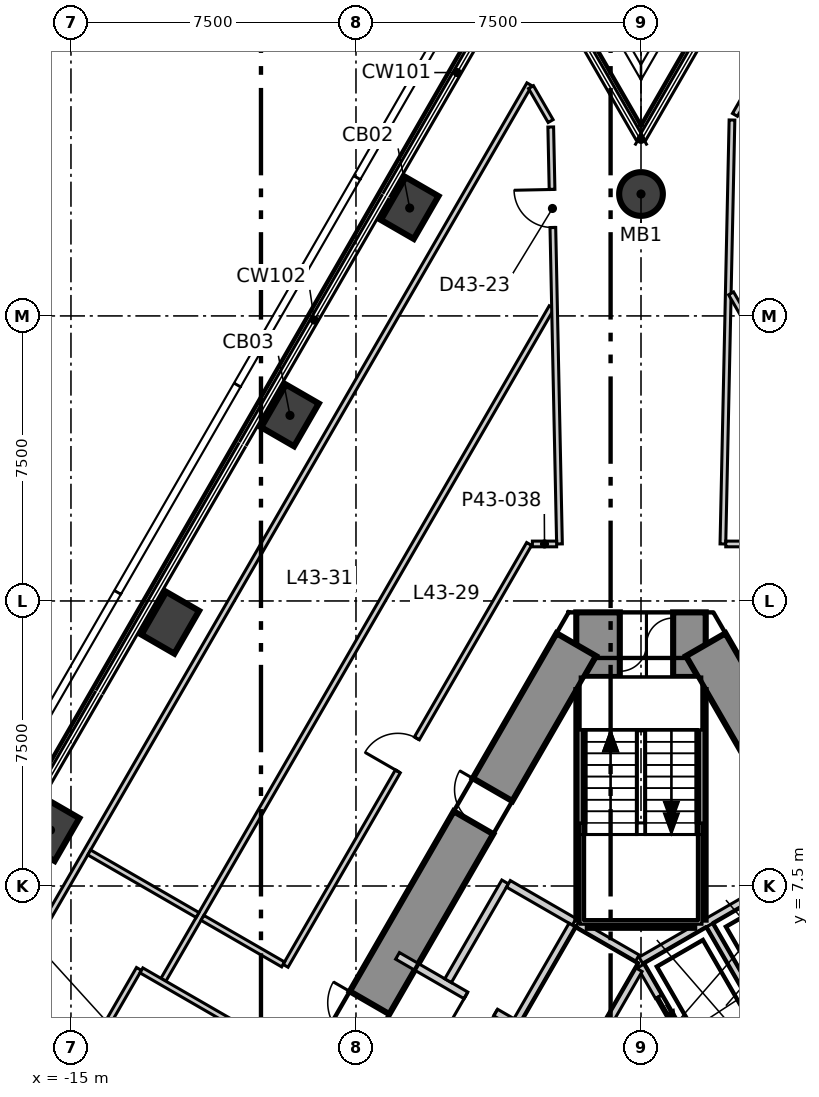
"""IFC4 building model, lengths in metres.
Left out: names, types, materials, properties, quantities, classifications, styles, units other than length and angle.
Written with IfcOpenShell. Run it as: python <this file> out.ifc"""

import sys

from ifc_helpers import new_model, si_unit, direction, frame, frame_2d, origin, origin_2d, place, context, subcontext, project, spatial, polyline, rectangle, circle, outline, extrude, element, fill, save


model = new_model("IFC4")
c1 = context("Model", 3, precision=1e-05, world=origin(), true_north=direction((0.0, 1.0)))
c2 = subcontext(c1, "Body", "Model", "MODEL_VIEW")
j1 = project(units=[si_unit("LENGTHUNIT", "METRE"), si_unit("PLANEANGLEUNIT", "RADIAN")], contexts=[c1])
p1 = place(None, origin())
s1 = spatial("IfcSite", under=j1, at=p1, CompositionType="ELEMENT")
p2 = place(p1, origin())
s2 = spatial("IfcBuilding", under=s1, at=p2, CompositionType="ELEMENT")
p3 = place(p2, frame((0.0, 0.0, 185.3)))
s3 = spatial("IfcBuildingStorey", under=s2, at=p3, CompositionType="ELEMENT", Elevation=185.3)
p4 = place(p3, frame((1.703, 13.85, -0.6), z_axis=(0.0, 0.0, 1.0), x_axis=(-1.0, 0.0, 0.0)))
e1 = element("IfcWall", 1, at=p4, inside=s3, PredefinedType="SHEAR", context=c2, shape_type="SweptSolid", body=[
    extrude(outline(polyline([(-0.202, -0.85), (1.703, -0.85), (3.608, -0.85), (3.204, 0.85), (1.703, 0.85), (0.202, 0.85), (-0.202, -0.85)])), origin(), (0.0, 0.0, 1.0), 6.3),
])
p5 = place(p4, frame((0.859, 0.0, 0.6)))
e2 = element("IfcOpeningElement", 2, at=p5, cuts=e1, PredefinedType="OPENING", context=c2, shape_type="SweptSolid", body=[
    extrude(rectangle(XDim=1.4, YDim=2.1, at=frame_2d((0.7, 1.05))), frame((0.0, 0.86, 0.0), z_axis=(0.0, -1.0, 0.0), x_axis=(1.0, 0.0, 0.0)), (0.0, 0.0, 1.0), 1.72),
])
p6 = place(p3, frame((-1.703, 13.85, -0.6), z_axis=(0.0, 0.0, 1.0), x_axis=(-0.500005991004, -0.866021944849, 0.0)))
e3 = element("IfcWall", 3, at=p6, inside=s3, PredefinedType="SHEAR", context=c2, shape_type="SweptSolid", body=[
    extrude(outline(polyline([(-0.635, -0.6), (1.328, -0.6), (3.291, -0.6), (5.254, -0.6), (7.217, -0.6), (9.18, -0.6), (11.143, -0.6), (13.106, -0.6), (15.069, -0.6), (17.032, -0.6), (18.995, -0.6), (20.958, -0.6), (22.921, -0.6), (21.651, 0.6), (19.74, 0.6), (17.83, 0.6), (15.919, 0.6), (14.009, 0.6), (12.098, 0.6), (10.188, 0.6), (8.277, 0.6), (6.367, 0.6), (4.456, 0.6), (2.546, 0.6), (0.635, 0.6), (-0.635, -0.6)])), origin(), (0.0, 0.0, 1.0), 6.3),
])
p7 = place(p6, frame((10.881, 0.0, 0.6)))
e4 = element("IfcOpeningElement", 4, at=p7, cuts=e3, PredefinedType="OPENING", context=c2, shape_type="SweptSolid", body=[
    extrude(rectangle(XDim=1.1, YDim=2.1, at=frame_2d((0.55, 1.05))), frame((0.0, 0.61, 0.0), z_axis=(0.0, -1.0, 0.0), x_axis=(1.0, 0.0, 0.0)), (0.0, 0.0, 1.0), 1.22),
])
p8 = place(p6, frame((4.407, 0.0, 0.6)))
e5 = element("IfcOpeningElement", 5, at=p8, cuts=e3, PredefinedType="OPENING", context=c2, shape_type="SweptSolid", body=[
    extrude(rectangle(XDim=1.0, YDim=2.1, at=frame_2d((0.5, 1.05))), frame((0.0, 0.61, 0.0), z_axis=(0.0, -1.0, 0.0), x_axis=(1.0, 0.0, 0.0)), (0.0, 0.0, 1.0), 1.22),
])
p9 = place(p3, frame((12.846, -5.45, -0.6), z_axis=(0.0, 0.0, 1.0), x_axis=(-0.500005991004, 0.866021944849, 0.0)))
e6 = element("IfcWall", 6, at=p9, inside=s3, PredefinedType="SHEAR", context=c2, shape_type="SweptSolid", body=[
    extrude(outline(polyline([(-0.635, -0.6), (1.328, -0.6), (3.291, -0.6), (5.254, -0.6), (7.217, -0.6), (9.18, -0.6), (11.143, -0.6), (13.106, -0.6), (15.069, -0.6), (17.032, -0.6), (18.995, -0.6), (20.958, -0.6), (22.921, -0.6), (21.651, 0.6), (19.74, 0.6), (17.83, 0.6), (15.919, 0.6), (14.009, 0.6), (12.098, 0.6), (10.188, 0.6), (8.277, 0.6), (6.367, 0.6), (4.456, 0.6), (2.546, 0.6), (0.635, 0.6), (-0.635, -0.6)])), origin(), (0.0, 0.0, 1.0), 6.3),
])
p10 = place(p9, frame((10.531, 0.0, 0.6)))
e7 = element("IfcOpeningElement", 7, at=p10, cuts=e6, PredefinedType="OPENING", context=c2, shape_type="SweptSolid", body=[
    extrude(rectangle(XDim=1.8, YDim=2.1, at=frame_2d((0.9, 1.05))), frame((0.0, 0.61, 0.0), z_axis=(0.0, -1.0, 0.0), x_axis=(1.0, 0.0, 0.0)), (0.0, 0.0, 1.0), 1.22),
])
p11 = place(p9, frame((17.506, 0.0, 0.6)))
e8 = element("IfcOpeningElement", 8, at=p11, cuts=e6, PredefinedType="OPENING", context=c2, shape_type="SweptSolid", body=[
    extrude(rectangle(XDim=0.9, YDim=2.1, at=frame_2d((0.45, 1.05))), frame((0.0, 0.61, 0.0), z_axis=(0.0, -1.0, 0.0), x_axis=(1.0, 0.0, 0.0)), (0.0, 0.0, 1.0), 1.22),
])
for number, where, z_axis, x_axis in (
    (9, (-6.087, 25.339, -0.6), (0.0, 0.0, 1.0), (0.5, 0.866, 0.0)),
    (10, (-9.237, 19.883, -0.6), (0.0, 0.0, 1.0), (0.5, 0.866, 0.0)),
    (11, (-12.387, 14.427, -0.6), (0.0, 0.0, 1.0), (0.5, 0.866, 0.0)),
    (12, (-15.538, 8.971, -0.6), (0.0, 0.0, 1.0), (0.5, 0.866, 0.0)),
):
    element("IfcColumn", number, at=place(p3, frame(where, z_axis=z_axis, x_axis=x_axis)), inside=s3, PredefinedType="COLUMN", context=c2, shape_type="SweptSolid", body=[
        extrude(rectangle(XDim=1.3, YDim=1.0, at=origin_2d()), origin(), (0.0, 0.0, 1.0), 6.3),
    ])
p12 = place(p3, frame((0.0, 25.708, -0.6), z_axis=(0.0, 0.0, 1.0), x_axis=(1.0, 0.0, 0.0)))
e13 = element("IfcColumn", 13, at=p12, inside=s3, PredefinedType="COLUMN", context=c2, shape_type="SweptSolid", body=[
    extrude(circle(Radius=0.575, at=origin_2d()), origin(), (0.0, 0.0, 1.0), 6.3),
])
p13 = place(p3, frame((2.155, 16.5, 0.0), z_axis=(0.0, 0.0, 1.0), x_axis=(0.021421622411, 0.999770530719, 0.0)))
e14 = element("IfcWall", 14, at=p13, inside=s3, PredefinedType="PARTITIONING", context=c2, shape_type="SweptSolid", body=[
    extrude(rectangle(XDim=11.157, YDim=0.15, at=frame_2d((5.579, 0.0))), origin(), (0.0, 0.0, 1.0), 5.0),
])
p14 = place(p3, frame((2.472, 27.79, 0.0), z_axis=(0.0, 0.0, 1.0), x_axis=(0.500290723946, 0.86585748916, 0.0)))
e15 = element("IfcWall", 15, at=p14, inside=s3, PredefinedType="PARTITIONING", context=c2, shape_type="SweptSolid", body=[
    extrude(rectangle(XDim=0.93, YDim=0.15, at=frame_2d((0.465, 0.0))), origin(), (0.0, 0.0, 1.0), 5.7),
])
p15 = place(p3, frame((2.23, 16.5, 0.0), z_axis=(0.0, 0.0, 1.0), x_axis=(1.0, 0.0, 0.0)))
e16 = element("IfcWall", 16, at=p15, inside=s3, PredefinedType="PARTITIONING", context=c2, shape_type="SweptSolid", body=[
    extrude(rectangle(XDim=0.628, YDim=0.15, at=frame_2d((0.314, 0.0))), origin(), (0.0, 0.0, 1.0), 5.7),
])
p16 = place(p3, frame((2.371, 23.093, 0.0), z_axis=(0.0, 0.0, 1.0), x_axis=(0.500006092323, -0.866021886352, 0.0)))
e17 = element("IfcWall", 17, at=p16, inside=s3, PredefinedType="PARTITIONING", context=c2, shape_type="SweptSolid", body=[
    extrude(rectangle(XDim=37.651, YDim=0.15, at=frame_2d((18.826, 0.0))), origin(), (0.0, 0.0, 1.0), 5.7),
])
p17 = place(p3, frame((-9.353, 5.4, 0.0), z_axis=(0.0, 0.0, 1.0), x_axis=(0.500017037849, 0.866015566754, 0.0)))
e18 = element("IfcWall", 18, at=p17, inside=s3, PredefinedType="PARTITIONING", context=c2, shape_type="SweptSolid", body=[
    extrude(rectangle(XDim=12.817, YDim=0.15, at=frame_2d((6.409, 0.0))), origin(), (0.0, 0.0, 1.0), 5.7),
])
p18 = place(p17, frame((5.909, 0.0, 0.0)))
e19 = element("IfcOpeningElement", 19, at=p18, cuts=e18, PredefinedType="OPENING", context=c2, shape_type="SweptSolid", body=[
    extrude(rectangle(XDim=1.0, YDim=2.1, at=frame_2d((0.5, 1.05))), frame((0.0, 0.085, 0.0), z_axis=(0.0, -1.0, 0.0), x_axis=(1.0, 0.0, 0.0)), (0.0, 0.0, 1.0), 0.17),
])
p19 = place(p3, frame((-12.567, 5.033, 0.0), z_axis=(0.0, 0.0, 1.0), x_axis=(0.499999287049, 0.866025815407, 0.0)))
e20 = element("IfcWall", 20, at=p19, inside=s3, PredefinedType="PARTITIONING", context=c2, shape_type="SweptSolid", body=[
    extrude(rectangle(XDim=20.434, YDim=0.15, at=frame_2d((10.217, 0.0))), origin(), (0.0, 0.0, 1.0), 5.7),
])
p20 = place(p3, frame((-26.19, -11.679, 0.0), z_axis=(0.0, 0.0, 1.0), x_axis=(0.500012382508, 0.866018254622, 0.0)))
e21 = element("IfcWall", 21, at=p20, inside=s3, PredefinedType="PARTITIONING", context=c2, shape_type="SweptSolid", body=[
    extrude(rectangle(XDim=46.505, YDim=0.15, at=frame_2d((23.252, 0.0))), origin(), (0.0, 0.0, 1.0), 5.7),
])
p21 = place(p3, frame((-2.894, 28.52, 0.0), z_axis=(0.0, 0.0, 1.0), x_axis=(0.500364349859, -0.865814944079, 0.0)))
e22 = element("IfcWall", 22, at=p21, inside=s3, PredefinedType="PARTITIONING", context=c2, shape_type="SweptSolid", body=[
    extrude(rectangle(XDim=1.031, YDim=0.15, at=frame_2d((0.516, 0.0))), origin(), (0.0, 0.0, 1.0), 5.7),
])
p22 = place(p3, frame((-2.375, 27.471, 0.0), z_axis=(0.0, 0.0, 1.0), x_axis=(0.020958076747, -0.999780355388, 0.0)))
e23 = element("IfcWall", 23, at=p22, inside=s3, PredefinedType="PARTITIONING", context=c2, shape_type="SweptSolid", body=[
    extrude(rectangle(XDim=10.973, YDim=0.15, at=frame_2d((5.487, 0.0))), origin(), (0.0, 0.0, 1.0), 5.0),
])
p23 = place(p22, frame((1.644, 0.0, 0.0)))
e24 = element("IfcOpeningElement", 24, at=p23, cuts=e23, PredefinedType="OPENING", context=c2, shape_type="SweptSolid", body=[
    extrude(rectangle(XDim=1.0, YDim=2.1, at=frame_2d((0.5, 1.05))), frame((0.0, 0.085, 0.0), z_axis=(0.0, -1.0, 0.0), x_axis=(1.0, 0.0, 0.0)), (0.0, 0.0, 1.0), 0.17),
])
p24 = place(p3, frame((-14.52, 8.383, 0.0), z_axis=(0.0, 0.0, 1.0), x_axis=(0.865960739811, -0.500111984565, 0.0)))
e25 = element("IfcWall", 25, at=p24, inside=s3, PredefinedType="PARTITIONING", context=c2, shape_type="SweptSolid", body=[
    extrude(rectangle(XDim=3.291, YDim=0.15, at=frame_2d((1.646, 0.0))), origin(), (0.0, 0.0, 1.0), 5.2),
])
p25 = place(p3, frame((-11.54, 6.662, 0.0), z_axis=(0.0, 0.0, 1.0), x_axis=(0.8660395779, -0.499975448907, 0.0)))
e26 = element("IfcWall", 26, at=p25, inside=s3, PredefinedType="PARTITIONING", context=c2, shape_type="SweptSolid", body=[
    extrude(rectangle(XDim=2.45, YDim=0.15, at=frame_2d((1.225, 0.0))), origin(), (0.0, 0.0, 1.0), 5.2),
])
p26 = place(p3, frame((-14.823, 2.525, 0.0), z_axis=(0.0, 0.0, 1.0), x_axis=(0.499860071841, 0.866106176273, 0.0)))
e27 = element("IfcWall", 27, at=p26, inside=s3, PredefinedType="PARTITIONING", context=c2, shape_type="SweptSolid", body=[
    extrude(rectangle(XDim=3.225, YDim=0.15, at=frame_2d((1.613, 0.0))), origin(), (0.0, 0.0, 1.0), 5.7),
])
p27 = place(p3, frame((-13.146, 5.28, 0.0), z_axis=(0.0, 0.0, 1.0), x_axis=(0.866035871367, -0.499981869177, 0.0)))
e28 = element("IfcWall", 28, at=p27, inside=s3, PredefinedType="PARTITIONING", context=c2, shape_type="SweptSolid", body=[
    extrude(rectangle(XDim=3.15, YDim=0.15, at=frame_2d((1.575, 0.0))), origin(), (0.0, 0.0, 1.0), 5.7),
])
p28 = place(p3, frame((-2.858, 16.5, 0.0), z_axis=(0.0, 0.0, 1.0), x_axis=(1.0, 0.0, 0.0)))
e29 = element("IfcWall", 29, at=p28, inside=s3, PredefinedType="PARTITIONING", context=c2, shape_type="SweptSolid", body=[
    extrude(rectangle(XDim=0.638, YDim=0.15, at=frame_2d((0.319, 0.0))), origin(), (0.0, 0.0, 1.0), 5.7),
])
p29 = place(p3, frame((-0.002, 5.541, 0.0), z_axis=(0.0, 0.0, 1.0), x_axis=(0.86600155993, 0.500041296494, 0.0)))
e30 = element("IfcWall", 30, at=p29, inside=s3, PredefinedType="SOLIDWALL", context=c2, shape_type="SweptSolid", body=[
    extrude(rectangle(XDim=4.132, YDim=0.2, at=frame_2d((2.066, 0.0))), origin(), (0.0, 0.0, 1.0), 5.7),
])
p30 = place(p3, frame((0.0, 5.4, 0.0), z_axis=(0.0, 0.0, 1.0), x_axis=(0.500103862429, -0.865965430478, 0.0)))
e31 = element("IfcWall", 31, at=p30, inside=s3, PredefinedType="SOLIDWALL", context=c2, shape_type="SweptSolid", body=[
    extrude(rectangle(XDim=2.973, YDim=0.2, at=frame_2d((1.487, 0.0))), origin(), (0.0, 0.0, 1.0), 5.7),
])
p31 = place(p30, frame((0.937, 0.0, 0.0)))
e32 = element("IfcOpeningElement", 32, at=p31, cuts=e31, PredefinedType="OPENING", context=c2, shape_type="SweptSolid", body=[
    extrude(rectangle(XDim=1.1, YDim=2.1, at=frame_2d((0.55, 1.05))), frame((0.0, 0.11, 0.0), z_axis=(0.0, -1.0, 0.0), x_axis=(1.0, 0.0, 0.0)), (0.0, 0.0, 1.0), 0.22),
])
p32 = place(p3, frame((1.577, 2.874, 0.0), z_axis=(0.0, 0.0, 1.0), x_axis=(0.866068955414, 0.499924558776, 0.0)))
e33 = element("IfcWall", 33, at=p32, inside=s3, PredefinedType="SOLIDWALL", context=c2, shape_type="SweptSolid", body=[
    extrude(rectangle(XDim=5.577, YDim=0.2, at=frame_2d((2.789, 0.0))), origin(), (0.0, 0.0, 1.0), 5.7),
])
p33 = place(p32, frame((2.497, 0.0, 0.0)))
e34 = element("IfcOpeningElement", 34, at=p33, cuts=e33, PredefinedType="OPENING", context=c2, shape_type="SweptSolid", body=[
    extrude(rectangle(XDim=1.1, YDim=2.1, at=frame_2d((0.55, 1.05))), frame((0.0, 0.11, 0.0), z_axis=(0.0, -1.0, 0.0), x_axis=(1.0, 0.0, 0.0)), (0.0, 0.0, 1.0), 0.22),
])
p34 = place(p3, frame((1.807, 6.47, 0.0), z_axis=(0.0, 0.0, 1.0), x_axis=(0.50012328804, -0.865954211699, 0.0)))
e35 = element("IfcWall", 35, at=p34, inside=s3, PredefinedType="SOLIDWALL", context=c2, shape_type="SweptSolid", body=[
    extrude(rectangle(XDim=2.9, YDim=0.2, at=frame_2d((1.45, 0.0))), origin(), (0.0, 0.0, 1.0), 5.7),
])
p35 = place(p3, frame((-6.407, 5.662, 0.0), z_axis=(0.0, 0.0, 1.0), x_axis=(0.866019870564, -0.500009583697, 0.0)))
e36 = element("IfcWall", 36, at=p35, inside=s3, PredefinedType="SOLIDWALL", context=c2, shape_type="SweptSolid", body=[
    extrude(rectangle(XDim=3.582, YDim=0.2, at=frame_2d((1.791, 0.0))), origin(), (0.0, 0.0, 1.0), 5.7),
])
p36 = place(p35, frame((2.08, 0.0, 0.0)))
e37 = element("IfcOpeningElement", 37, at=p36, cuts=e36, PredefinedType="OPENING", context=c2, shape_type="SweptSolid", body=[
    extrude(rectangle(XDim=0.9, YDim=2.1, at=frame_2d((0.45, 1.05))), frame((0.0, 0.11, 0.0), z_axis=(0.0, -1.0, 0.0), x_axis=(1.0, 0.0, 0.0)), (0.0, 0.0, 1.0), 0.22),
])
p37 = place(p3, frame((-5.076, 5.009, 0.0), z_axis=(0.0, 0.0, 1.0), x_axis=(0.50002537861, 0.866010750942, 0.0)))
e38 = element("IfcWall", 38, at=p37, inside=s3, PredefinedType="SOLIDWALL", context=c2, shape_type="SweptSolid", body=[
    extrude(rectangle(XDim=3.0, YDim=0.2, at=frame_2d((1.5, 0.0))), origin(), (0.0, 0.0, 1.0), 5.7),
])
p38 = place(p3, frame((-3.489, 7.557, 0.0), z_axis=(0.0, 0.0, 1.0), x_axis=(0.866010750942, -0.50002537861, 0.0)))
e39 = element("IfcWall", 39, at=p38, inside=s3, PredefinedType="SOLIDWALL", context=c2, shape_type="SweptSolid", body=[
    extrude(rectangle(XDim=2.0, YDim=0.2, at=frame_2d((1.0, 0.0))), origin(), (0.0, 0.0, 1.0), 5.7),
])
p39 = place(p3, frame((-3.257, 3.959, 0.0), z_axis=(0.0, 0.0, 1.0), x_axis=(0.50012328804, 0.865954211699, 0.0)))
e40 = element("IfcWall", 40, at=p39, inside=s3, PredefinedType="SOLIDWALL", context=c2, shape_type="SweptSolid", body=[
    extrude(rectangle(XDim=2.9, YDim=0.2, at=frame_2d((1.45, 0.0))), origin(), (0.0, 0.0, 1.0), 5.7),
])
p40 = place(p3, frame((-1.67, 6.507, 0.0), z_axis=(0.0, 0.0, 1.0), x_axis=(0.865941441609, -0.500145398563, 0.0)))
e41 = element("IfcWall", 41, at=p40, inside=s3, PredefinedType="SOLIDWALL", context=c2, shape_type="SweptSolid", body=[
    extrude(rectangle(XDim=1.815, YDim=0.2, at=frame_2d((0.908, 0.0))), origin(), (0.0, 0.0, 1.0), 5.7),
])
p41 = place(p3, frame((-1.438, 2.909, 0.0), z_axis=(0.0, 0.0, 1.0), x_axis=(0.499829630636, 0.866123744241, 0.0)))
e42 = element("IfcWall", 42, at=p41, inside=s3, PredefinedType="SOLIDWALL", context=c2, shape_type="SweptSolid", body=[
    extrude(rectangle(XDim=2.761, YDim=0.2, at=frame_2d((1.38, 0.0))), origin(), (0.0, 0.0, 1.0), 5.7),
])
p42 = place(p3, frame((1.6, 6.615, 0.0), z_axis=(0.0, 0.0, 1.0), x_axis=(0.0, 1.0, 0.0)))
e43 = element("IfcWall", 43, at=p42, inside=s3, PredefinedType="SOLIDWALL", context=c2, shape_type="SweptSolid", body=[
    extrude(rectangle(XDim=6.04, YDim=0.2, at=frame_2d((3.02, 0.0))), origin(), (0.0, 0.0, 1.0), 5.7),
])
p43 = place(p3, frame((-1.4, 6.5, 0.0), z_axis=(0.0, 0.0, 1.0), x_axis=(1.0, 0.0, 0.0)))
e44 = element("IfcWall", 44, at=p43, inside=s3, PredefinedType="SOLIDWALL", context=c2, shape_type="SweptSolid", body=[
    extrude(rectangle(XDim=2.8, YDim=0.2, at=frame_2d((1.4, 0.0))), origin(), (0.0, 0.0, 1.0), 5.7),
])
p44 = place(p3, frame((-1.6, 6.615, 0.0), z_axis=(0.0, 0.0, 1.0), x_axis=(0.0, 1.0, 0.0)))
e45 = element("IfcWall", 45, at=p44, inside=s3, PredefinedType="SOLIDWALL", context=c2, shape_type="SweptSolid", body=[
    extrude(rectangle(XDim=6.04, YDim=0.2, at=frame_2d((3.02, 0.0))), origin(), (0.0, 0.0, 1.0), 5.7),
])
p45 = place(p31, origin())
e46 = element("IfcDoor", 46, at=p45, inside=s3, OperationType="SLIDING_TO_LEFT", PredefinedType="DOOR", context=c2, shape_type="SweptSolid", body=[
    extrude(rectangle(XDim=1.1, YDim=2.1, at=frame_2d((0.55, 1.05))), frame((0.0, 0.025, 0.0), z_axis=(0.0, -1.0, 0.0), x_axis=(1.0, 0.0, 0.0)), (0.0, 0.0, 1.0), 0.05),
])
fill(e32, e46)
p46 = place(p36, origin())
e47 = element("IfcDoor", 47, at=p46, inside=s3, OperationType="SINGLE_SWING_LEFT", PredefinedType="DOOR", context=c2, shape_type="SweptSolid", body=[
    extrude(rectangle(XDim=0.9, YDim=2.1, at=frame_2d((0.45, 1.05))), frame((0.0, 0.025, 0.0), z_axis=(0.0, -1.0, 0.0), x_axis=(1.0, 0.0, 0.0)), (0.0, 0.0, 1.0), 0.05),
])
fill(e37, e47)
p47 = place(p18, origin())
e48 = element("IfcDoor", 48, at=p47, inside=s3, OperationType="SINGLE_SWING_RIGHT", PredefinedType="DOOR", context=c2, shape_type="SweptSolid", body=[
    extrude(rectangle(XDim=1.0, YDim=2.1, at=frame_2d((0.5, 1.05))), frame((0.0, 0.025, 0.0), z_axis=(0.0, -1.0, 0.0), x_axis=(1.0, 0.0, 0.0)), (0.0, 0.0, 1.0), 0.05),
])
fill(e19, e48)
p48 = place(p23, origin())
e49 = element("IfcDoor", 49, at=p48, inside=s3, OperationType="SINGLE_SWING_LEFT", PredefinedType="DOOR", context=c2, shape_type="SweptSolid", body=[
    extrude(rectangle(XDim=1.0, YDim=2.1, at=frame_2d((0.5, 1.05))), frame((0.0, 0.025, 0.0), z_axis=(0.0, -1.0, 0.0), x_axis=(1.0, 0.0, 0.0)), (0.0, 0.0, 1.0), 0.05),
])
fill(e24, e49)
p49 = place(p5, origin())
e50 = element("IfcDoor", 50, at=p49, inside=s3, OperationType="DOUBLE_DOOR_SINGLE_SWING", PredefinedType="DOOR", context=c2, shape_type="SweptSolid", body=[
    extrude(rectangle(XDim=1.4, YDim=2.1, at=frame_2d((0.7, 1.05))), frame((0.0, 0.025, 0.0), z_axis=(0.0, -1.0, 0.0), x_axis=(1.0, 0.0, 0.0)), (0.0, 0.0, 1.0), 0.05),
])
fill(e2, e50)
p50 = place(p7, origin())
e51 = element("IfcDoor", 51, at=p50, inside=s3, OperationType="SINGLE_SWING_LEFT", PredefinedType="DOOR", context=c2, shape_type="SweptSolid", body=[
    extrude(rectangle(XDim=1.1, YDim=2.1, at=frame_2d((0.55, 1.05))), frame((0.0, 0.025, 0.0), z_axis=(0.0, -1.0, 0.0), x_axis=(1.0, 0.0, 0.0)), (0.0, 0.0, 1.0), 0.05),
])
fill(e4, e51)
p51 = place(p8, origin())
e52 = element("IfcDoor", 52, at=p51, inside=s3, OperationType="SINGLE_SWING_LEFT", PredefinedType="DOOR", context=c2, shape_type="SweptSolid", body=[
    extrude(rectangle(XDim=1.0, YDim=2.1, at=frame_2d((0.5, 1.05))), frame((0.0, 0.025, 0.0), z_axis=(0.0, -1.0, 0.0), x_axis=(1.0, 0.0, 0.0)), (0.0, 0.0, 1.0), 0.05),
])
fill(e5, e52)
save(model, sys.argv[1])
